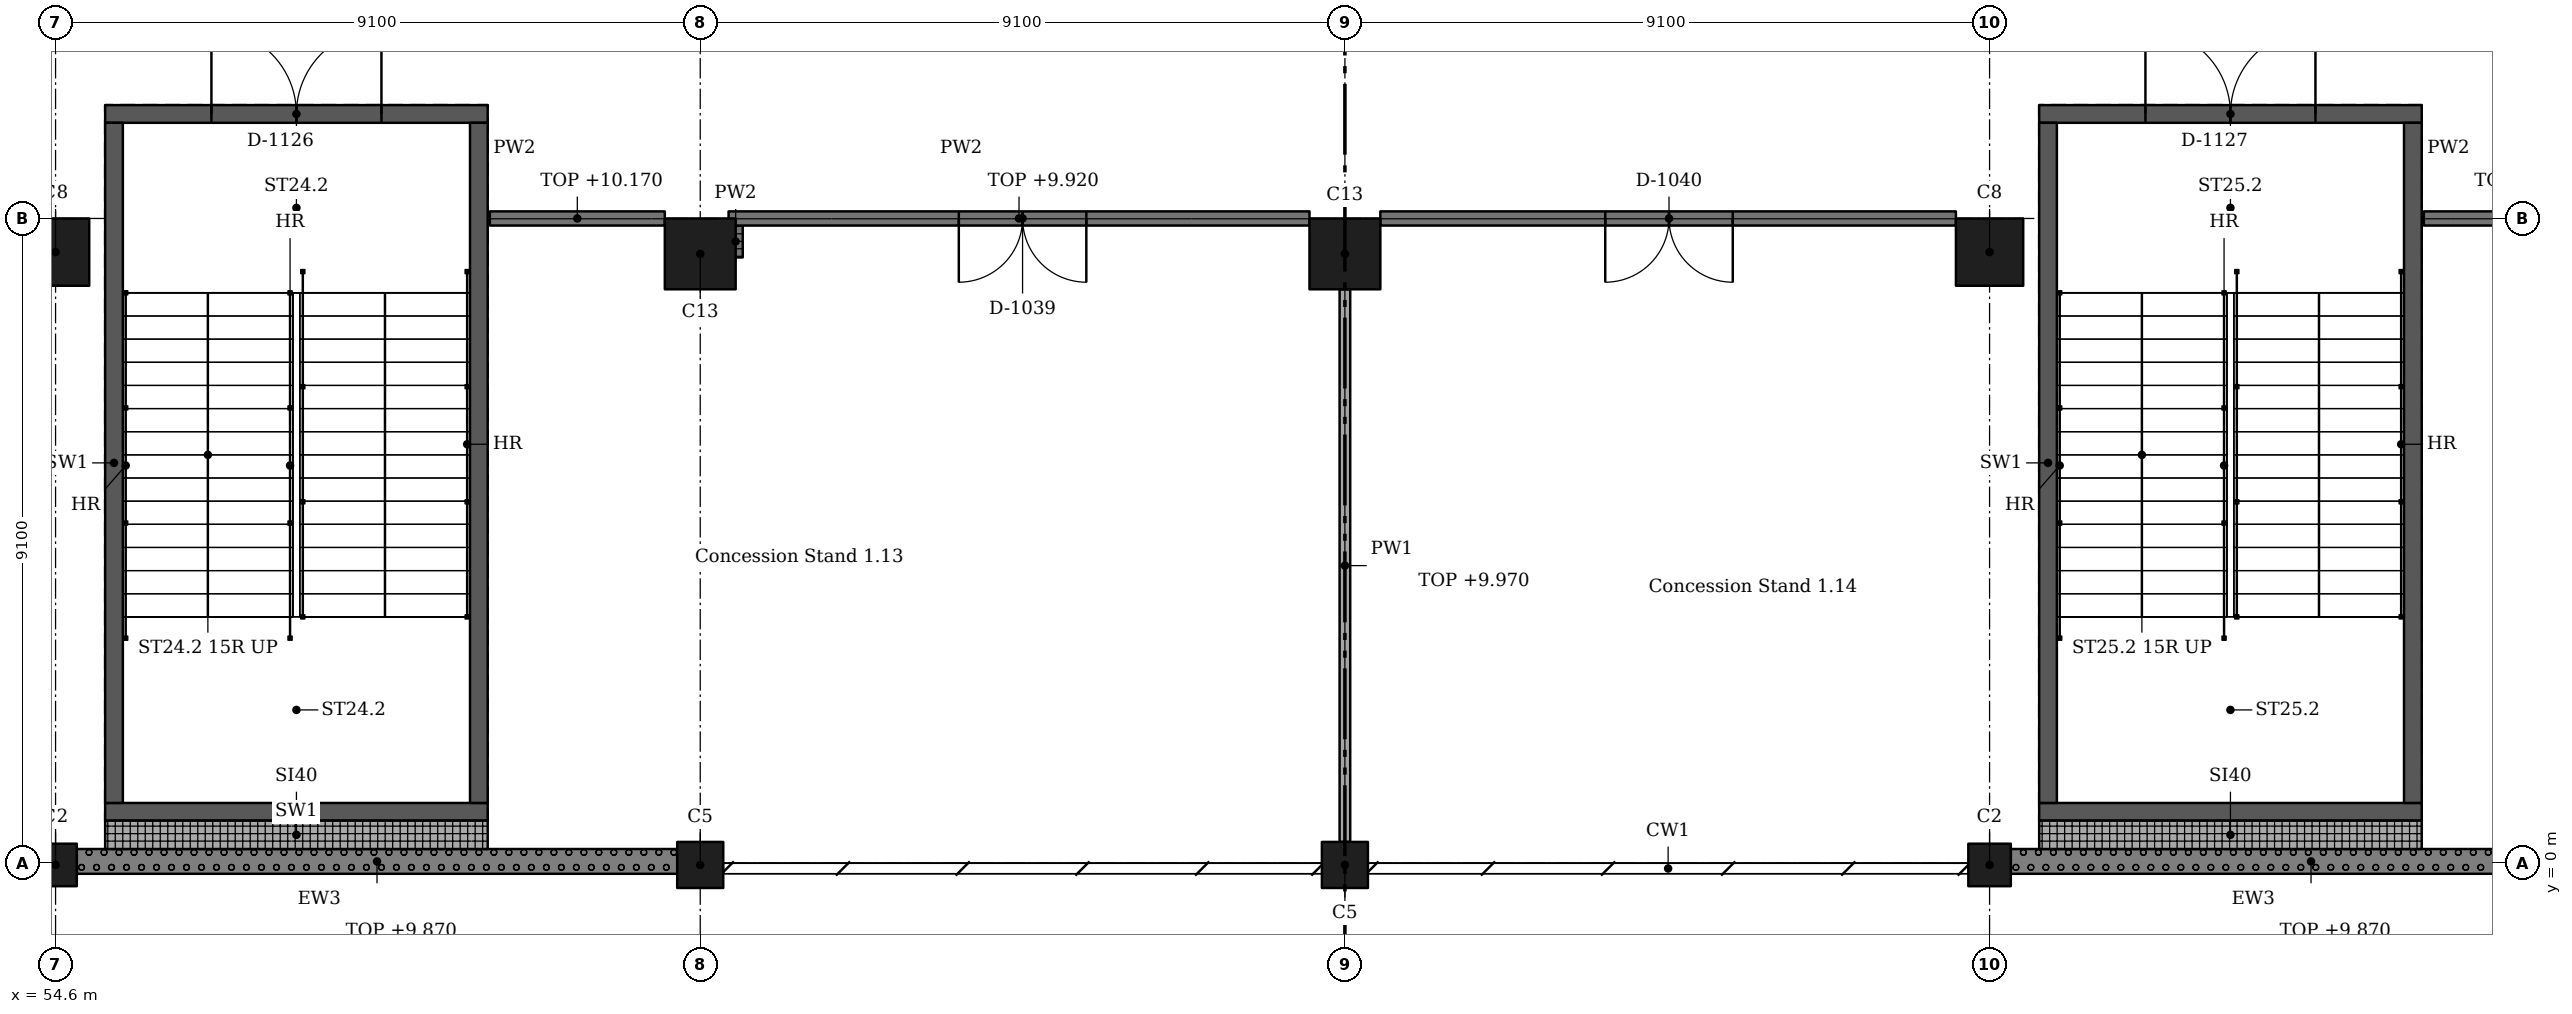
"""IFC4 building model, lengths in metres.
Left out: names, types, materials, properties, quantities, classifications, styles, units other than length and angle.
Written with IfcOpenShell. Run it as: python <this file> out.ifc"""

import sys

from ifc_helpers import new_model, si_unit, direction, frame, frame_2d, origin, origin_2d, place, context, subcontext, project, spatial, rectangle, extrude, element, fill, save


model = new_model("IFC4")
c1 = context("Model", 3, precision=1e-05, world=origin(), true_north=direction((0.0, 1.0)))
c2 = subcontext(c1, "Body", "Model", "MODEL_VIEW")
j1 = project(units=[si_unit("LENGTHUNIT", "METRE"), si_unit("PLANEANGLEUNIT", "RADIAN")], contexts=[c1])
p1 = place(None, origin())
s1 = spatial("IfcSite", under=j1, at=p1, CompositionType="ELEMENT")
p2 = place(p1, origin())
s2 = spatial("IfcBuilding", under=s1, at=p2, CompositionType="ELEMENT")
p3 = place(p2, frame((0.0, 0.0, 6.37)))
s3 = spatial("IfcBuildingStorey", under=s2, at=p3, CompositionType="ELEMENT", Elevation=6.37)
p4 = place(p3, frame((54.6, -0.025, 0.0), z_axis=(0.0, 0.0, 1.0), x_axis=(1.0, 0.0, 0.0)))
e1 = element("IfcColumn", 1, at=p4, inside=s3, PredefinedType="COLUMN", context=c2, shape_type="SweptSolid", body=[
    extrude(rectangle(XDim=0.6, YDim=0.6, at=origin_2d()), origin(), (0.0, 0.0, 1.0), 4.55),
])
p5 = place(p3, frame((54.6, 8.625, 0.0), z_axis=(0.0, 0.0, 1.0), x_axis=(1.0, 0.0, 0.0)))
e2 = element("IfcColumn", 2, at=p5, inside=s3, PredefinedType="COLUMN", context=c2, shape_type="SweptSolid", body=[
    extrude(rectangle(XDim=0.95, YDim=0.95, at=origin_2d()), origin(), (0.0, 0.0, 1.0), 4.55),
])
p6 = place(p3, frame((63.7, -0.025, 0.0), z_axis=(0.0, 0.0, 1.0), x_axis=(1.0, 0.0, 0.0)))
e3 = element("IfcColumn", 3, at=p6, inside=s3, PredefinedType="COLUMN", context=c2, shape_type="SweptSolid", body=[
    extrude(rectangle(XDim=0.65, YDim=0.65, at=origin_2d()), origin(), (0.0, 0.0, 1.0), 4.55),
])
p7 = place(p3, frame((63.7, 8.6, 0.0), z_axis=(0.0, 0.0, 1.0), x_axis=(1.0, 0.0, 0.0)))
e4 = element("IfcColumn", 4, at=p7, inside=s3, PredefinedType="COLUMN", context=c2, shape_type="SweptSolid", body=[
    extrude(rectangle(XDim=1.0, YDim=1.0, at=origin_2d()), origin(), (0.0, 0.0, 1.0), 4.55),
])
p8 = place(p3, frame((72.8, -0.025, 0.0), z_axis=(0.0, 0.0, 1.0), x_axis=(1.0, 0.0, 0.0)))
e5 = element("IfcColumn", 5, at=p8, inside=s3, PredefinedType="COLUMN", context=c2, shape_type="SweptSolid", body=[
    extrude(rectangle(XDim=0.65, YDim=0.65, at=origin_2d()), origin(), (0.0, 0.0, 1.0), 4.55),
])
p9 = place(p3, frame((72.8, 8.6, 0.0), z_axis=(0.0, 0.0, 1.0), x_axis=(1.0, 0.0, 0.0)))
e6 = element("IfcColumn", 6, at=p9, inside=s3, PredefinedType="COLUMN", context=c2, shape_type="SweptSolid", body=[
    extrude(rectangle(XDim=1.0, YDim=1.0, at=origin_2d()), origin(), (0.0, 0.0, 1.0), 4.55),
])
p10 = place(p3, frame((81.9, -0.025, 0.0), z_axis=(0.0, 0.0, 1.0), x_axis=(1.0, 0.0, 0.0)))
e7 = element("IfcColumn", 7, at=p10, inside=s3, PredefinedType="COLUMN", context=c2, shape_type="SweptSolid", body=[
    extrude(rectangle(XDim=0.6, YDim=0.6, at=origin_2d()), origin(), (0.0, 0.0, 1.0), 4.55),
])
p11 = place(p3, frame((81.9, 8.625, 0.0), z_axis=(0.0, 0.0, 1.0), x_axis=(1.0, 0.0, 0.0)))
e8 = element("IfcColumn", 8, at=p11, inside=s3, PredefinedType="COLUMN", context=c2, shape_type="SweptSolid", body=[
    extrude(rectangle(XDim=0.95, YDim=0.95, at=origin_2d()), origin(), (0.0, 0.0, 1.0), 4.55),
])
p12 = place(p3, frame((60.7, 0.725, 0.0), z_axis=(0.0, 0.0, 1.0), x_axis=(-1.0, 0.0, 0.0)))
e9 = element("IfcWall", 9, at=p12, inside=s3, PredefinedType="SHEAR", context=c2, shape_type="SweptSolid", body=[
    extrude(rectangle(XDim=5.4, YDim=0.25, at=frame_2d((2.7, 0.0))), origin(), (0.0, 0.0, 1.0), 4.55),
])
p13 = place(p3, frame((60.7, 10.575, 0.0), z_axis=(0.0, 0.0, 1.0), x_axis=(-1.0, 0.0, 0.0)))
e10 = element("IfcWall", 10, at=p13, inside=s3, PredefinedType="SHEAR", context=c2, shape_type="SweptSolid", body=[
    extrude(rectangle(XDim=5.4, YDim=0.25, at=frame_2d((2.7, 0.0))), origin(), (0.0, 0.0, 1.0), 4.55),
])
p14 = place(p13, frame((1.5, 0.0, 0.0)))
e11 = element("IfcOpeningElement", 11, at=p14, cuts=e10, PredefinedType="OPENING", context=c2, shape_type="SweptSolid", body=[
    extrude(rectangle(XDim=2.4, YDim=2.1, at=frame_2d((1.2, 1.05))), frame((0.0, 0.135, 0.0), z_axis=(0.0, -1.0, 0.0), x_axis=(1.0, 0.0, 0.0)), (0.0, 0.0, 1.0), 0.27),
])
for number, where, z_axis, x_axis in (
    (12, (55.425, 10.45, 0.0), (0.0, 0.0, 1.0), (0.0, -1.0, 0.0)),
    (13, (60.575, 10.45, 0.0), (0.0, 0.0, 1.0), (0.0, -1.0, 0.0)),
):
    element("IfcWall", number, at=place(p3, frame(where, z_axis=z_axis, x_axis=x_axis)), inside=s3, PredefinedType="SHEAR", context=c2, shape_type="SweptSolid", body=[
        extrude(rectangle(XDim=9.6, YDim=0.25, at=frame_2d((4.8, 0.0))), origin(), (0.0, 0.0, 1.0), 4.55),
    ])
p15 = place(p3, frame((88.0, 0.725, 0.0), z_axis=(0.0, 0.0, 1.0), x_axis=(-1.0, 0.0, 0.0)))
e14 = element("IfcWall", 14, at=p15, inside=s3, PredefinedType="SHEAR", context=c2, shape_type="SweptSolid", body=[
    extrude(rectangle(XDim=5.4, YDim=0.25, at=frame_2d((2.7, 0.0))), origin(), (0.0, 0.0, 1.0), 4.55),
])
p16 = place(p3, frame((88.0, 10.575, 0.0), z_axis=(0.0, 0.0, 1.0), x_axis=(-1.0, 0.0, 0.0)))
e15 = element("IfcWall", 15, at=p16, inside=s3, PredefinedType="SHEAR", context=c2, shape_type="SweptSolid", body=[
    extrude(rectangle(XDim=5.4, YDim=0.25, at=frame_2d((2.7, 0.0))), origin(), (0.0, 0.0, 1.0), 4.55),
])
p17 = place(p16, frame((1.5, 0.0, 0.0)))
e16 = element("IfcOpeningElement", 16, at=p17, cuts=e15, PredefinedType="OPENING", context=c2, shape_type="SweptSolid", body=[
    extrude(rectangle(XDim=2.4, YDim=2.1, at=frame_2d((1.2, 1.05))), frame((0.0, 0.135, 0.0), z_axis=(0.0, -1.0, 0.0), x_axis=(1.0, 0.0, 0.0)), (0.0, 0.0, 1.0), 0.27),
])
for number, where, z_axis, x_axis in (
    (17, (82.725, 10.45, 0.0), (0.0, 0.0, 1.0), (0.0, -1.0, 0.0)),
    (18, (87.875, 10.45, 0.0), (0.0, 0.0, 1.0), (0.0, -1.0, 0.0)),
):
    element("IfcWall", number, at=place(p3, frame(where, z_axis=z_axis, x_axis=x_axis)), inside=s3, PredefinedType="SHEAR", context=c2, shape_type="SweptSolid", body=[
        extrude(rectangle(XDim=9.6, YDim=0.25, at=frame_2d((4.8, 0.0))), origin(), (0.0, 0.0, 1.0), 4.55),
    ])
for number, where, z_axis, x_axis in (
    (19, (54.9, 0.025, 0.0), (0.0, 0.0, 1.0), (1.0, 0.0, 0.0)),
    (20, (82.2, 0.025, 0.0), (0.0, 0.0, 1.0), (1.0, 0.0, 0.0)),
):
    element("IfcWall", number, at=place(p3, frame(where, z_axis=z_axis, x_axis=x_axis)), inside=s3, PredefinedType="SOLIDWALL", context=c2, shape_type="SweptSolid", body=[
        extrude(rectangle(XDim=8.475, YDim=0.35, at=frame_2d((4.238, 0.0))), origin(), (0.0, 0.0, 1.0), 3.5),
    ])
for number, where, z_axis, x_axis in (
    (21, (55.3, 0.4, 0.0), (0.0, 0.0, 1.0), (1.0, 0.0, 0.0)),
    (22, (82.6, 0.4, 0.0), (0.0, 0.0, 1.0), (1.0, 0.0, 0.0)),
):
    element("IfcWall", number, at=place(p3, frame(where, z_axis=z_axis, x_axis=x_axis)), inside=s3, PredefinedType="SOLIDWALL", context=c2, shape_type="SweptSolid", body=[
        extrude(rectangle(XDim=5.4, YDim=0.4, at=frame_2d((2.7, 0.0))), origin(), (0.0, 0.0, 1.0), 4.25),
    ])
p18 = place(p3, frame((63.2, 9.1, 0.0), z_axis=(0.0, 0.0, 1.0), x_axis=(-1.0, 0.0, 0.0)))
e23 = element("IfcWall", 23, at=p18, inside=s3, PredefinedType="PARTITIONING", context=c2, shape_type="SweptSolid", body=[
    extrude(rectangle(XDim=2.47, YDim=0.2, at=frame_2d((1.235, 0.0))), origin(), (0.0, 0.0, 1.0), 3.8),
])
p19 = place(p3, frame((64.2, 9.0, 0.0), z_axis=(0.0, 0.0, 1.0), x_axis=(0.0, -1.0, 0.0)))
e24 = element("IfcWall", 24, at=p19, inside=s3, PredefinedType="PARTITIONING", context=c2, shape_type="SweptSolid", body=[
    extrude(rectangle(XDim=0.45, YDim=0.2, at=frame_2d((0.225, 0.0))), origin(), (0.0, 0.0, 1.0), 4.25),
])
p20 = place(p3, frame((72.3, 9.1, 0.0), z_axis=(0.0, 0.0, 1.0), x_axis=(-1.0, 0.0, 0.0)))
e25 = element("IfcWall", 25, at=p20, inside=s3, PredefinedType="PARTITIONING", context=c2, shape_type="SweptSolid", body=[
    extrude(rectangle(XDim=8.2, YDim=0.2, at=frame_2d((4.1, 0.0))), origin(), (0.0, 0.0, 1.0), 3.55),
])
p21 = place(p20, frame((3.15, 0.0, 0.0)))
e26 = element("IfcOpeningElement", 26, at=p21, cuts=e25, PredefinedType="OPENING", context=c2, shape_type="SweptSolid", body=[
    extrude(rectangle(XDim=1.8, YDim=2.1, at=frame_2d((0.9, 1.05))), frame((0.0, 0.11, 0.0), z_axis=(0.0, -1.0, 0.0), x_axis=(1.0, 0.0, 0.0)), (0.0, 0.0, 1.0), 0.22),
])
p22 = place(p3, frame((72.8, 8.1, 0.0), z_axis=(0.0, 0.0, 1.0), x_axis=(0.0, -1.0, 0.0)))
e27 = element("IfcWall", 27, at=p22, inside=s3, PredefinedType="PARTITIONING", context=c2, shape_type="SweptSolid", body=[
    extrude(rectangle(XDim=7.8, YDim=0.15, at=frame_2d((3.9, 0.0))), origin(), (0.0, 0.0, 1.0), 3.6),
])
p23 = place(p3, frame((81.425, 9.1, 0.0), z_axis=(0.0, 0.0, 1.0), x_axis=(-1.0, 0.0, 0.0)))
e28 = element("IfcWall", 28, at=p23, inside=s3, PredefinedType="PARTITIONING", context=c2, shape_type="SweptSolid", body=[
    extrude(rectangle(XDim=8.125, YDim=0.2, at=frame_2d((4.062, 0.0))), origin(), (0.0, 0.0, 1.0), 3.55),
])
p24 = place(p23, frame((3.15, 0.0, 0.0)))
e29 = element("IfcOpeningElement", 29, at=p24, cuts=e28, PredefinedType="OPENING", context=c2, shape_type="SweptSolid", body=[
    extrude(rectangle(XDim=1.8, YDim=2.1, at=frame_2d((0.9, 1.05))), frame((0.0, 0.11, 0.0), z_axis=(0.0, -1.0, 0.0), x_axis=(1.0, 0.0, 0.0)), (0.0, 0.0, 1.0), 0.22),
])
p25 = place(p3, frame((90.5, 9.1, 0.0), z_axis=(0.0, 0.0, 1.0), x_axis=(-1.0, 0.0, 0.0)))
e30 = element("IfcWall", 30, at=p25, inside=s3, PredefinedType="PARTITIONING", context=c2, shape_type="SweptSolid", body=[
    extrude(rectangle(XDim=2.47, YDim=0.2, at=frame_2d((1.235, 0.0))), origin(), (0.0, 0.0, 1.0), 3.8),
])
p26 = place(p21, origin())
e31 = element("IfcDoor", 31, at=p26, inside=s3, OperationType="DOUBLE_DOOR_SINGLE_SWING", PredefinedType="DOOR", context=c2, shape_type="SweptSolid", body=[
    extrude(rectangle(XDim=1.8, YDim=2.1, at=frame_2d((0.9, 1.05))), frame((0.0, 0.025, 0.0), z_axis=(0.0, -1.0, 0.0), x_axis=(1.0, 0.0, 0.0)), (0.0, 0.0, 1.0), 0.05),
])
fill(e26, e31)
p27 = place(p24, origin())
e32 = element("IfcDoor", 32, at=p27, inside=s3, OperationType="DOUBLE_DOOR_SINGLE_SWING", PredefinedType="DOOR", context=c2, shape_type="SweptSolid", body=[
    extrude(rectangle(XDim=1.8, YDim=2.1, at=frame_2d((0.9, 1.05))), frame((0.0, 0.025, 0.0), z_axis=(0.0, -1.0, 0.0), x_axis=(1.0, 0.0, 0.0)), (0.0, 0.0, 1.0), 0.05),
])
fill(e29, e32)
p28 = place(p14, origin())
e33 = element("IfcDoor", 33, at=p28, inside=s3, OperationType="DOUBLE_DOOR_SINGLE_SWING", PredefinedType="DOOR", context=c2, shape_type="SweptSolid", body=[
    extrude(rectangle(XDim=2.4, YDim=2.1, at=frame_2d((1.2, 1.05))), frame((0.0, 0.025, 0.0), z_axis=(0.0, -1.0, 0.0), x_axis=(1.0, 0.0, 0.0)), (0.0, 0.0, 1.0), 0.05),
])
fill(e11, e33)
p29 = place(p17, origin())
e34 = element("IfcDoor", 34, at=p29, inside=s3, OperationType="DOUBLE_DOOR_SINGLE_SWING", PredefinedType="DOOR", context=c2, shape_type="SweptSolid", body=[
    extrude(rectangle(XDim=2.4, YDim=2.1, at=frame_2d((1.2, 1.05))), frame((0.0, 0.025, 0.0), z_axis=(0.0, -1.0, 0.0), x_axis=(1.0, 0.0, 0.0)), (0.0, 0.0, 1.0), 0.05),
])
fill(e16, e34)
save(model, sys.argv[1])
